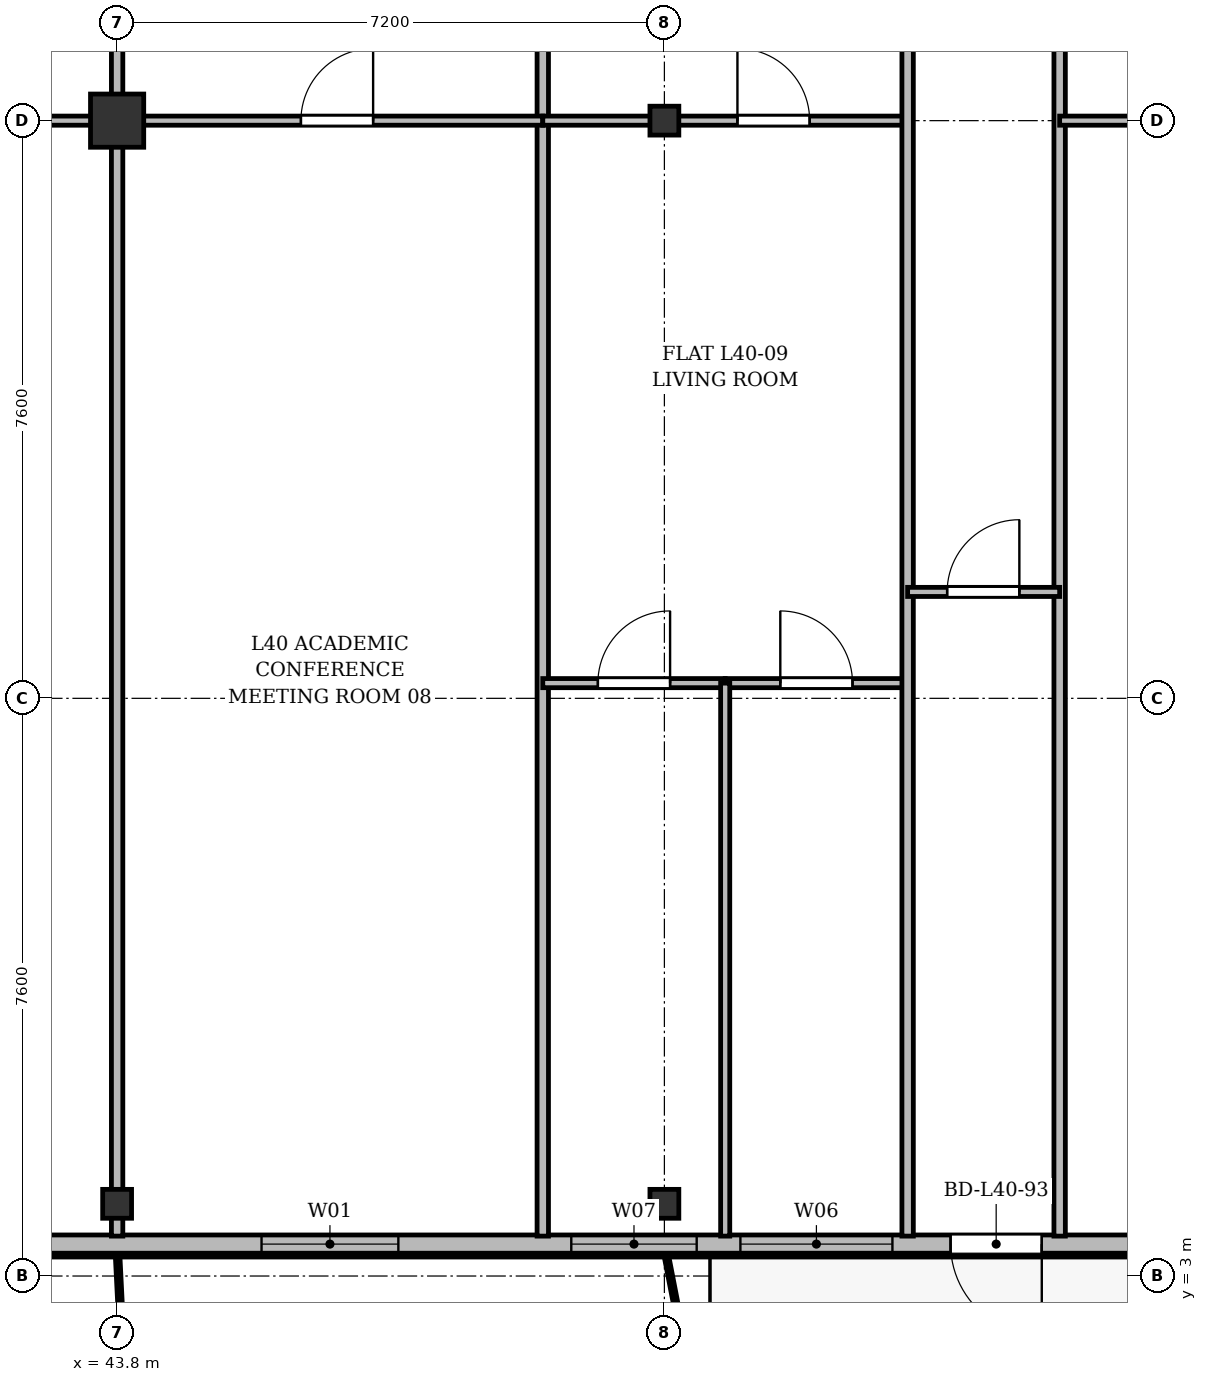
"""IFC4 building model, lengths in metres.
Left out: names, types, materials, properties, quantities, classifications, styles, units other than length and angle.
Written with IfcOpenShell. Run it as: python <this file> out.ifc"""

import sys

from ifc_helpers import new_model, si_unit, direction, frame, frame_2d, origin, origin_2d, place, context, subcontext, project, spatial, rectangle, i_section, extrude, source, transform, mapped, element, fill, save


model = new_model("IFC4")
c1 = context("Model", 3, precision=1e-05, world=origin(), true_north=direction((0.0, 1.0)))
c2 = subcontext(c1, "Body", "Model", "MODEL_VIEW")
j1 = project(units=[si_unit("LENGTHUNIT", "METRE"), si_unit("PLANEANGLEUNIT", "RADIAN")], contexts=[c1])
p1 = place(None, origin())
s1 = spatial("IfcSite", under=j1, at=p1, CompositionType="ELEMENT")
p2 = place(p1, origin())
s2 = spatial("IfcBuilding", under=s1, at=p2, CompositionType="ELEMENT")
p3 = place(p2, frame((0.0, 0.0, 153.7)))
s3 = spatial("IfcBuildingStorey", under=s2, at=p3, CompositionType="ELEMENT", Elevation=153.7)
m1 = source(origin(), c2, "Body", "SweptSolid", [
    extrude(i_section(OverallWidth=0.38, OverallDepth=0.38, WebThickness=0.02, FlangeThickness=0.03, at=origin_2d()), origin(), (0.0, 0.0, 1.0), 3.6),
])
p4 = place(p3, frame((43.8, 3.95, 0.0), z_axis=(0.0, 0.0, 1.0), x_axis=(1.0, 0.0, 0.0)))
e1 = element("IfcColumn", 1, at=p4, inside=s3, PredefinedType="COLUMN", context=c2, shape_type="MappedRepresentation", body=[
    mapped(m1, transform((0.0, 0.0, 0.0), x_axis=(1.0, 0.0, 0.0), y_axis=(0.0, 1.0, 0.0), z_axis=(0.0, 0.0, 1.0), scale=1.0)),
])
m2 = source(origin(), c2, "Body", "SweptSolid", [
    extrude(rectangle(XDim=0.7, YDim=0.7, at=origin_2d()), origin(), (0.0, 0.0, 1.0), 3.6),
])
p5 = place(p3, frame((43.8, 18.2, 0.0), z_axis=(0.0, 0.0, 1.0), x_axis=(1.0, 0.0, 0.0)))
e2 = element("IfcColumn", 2, at=p5, inside=s3, PredefinedType="COLUMN", context=c2, shape_type="MappedRepresentation", body=[
    mapped(m2, transform((0.0, 0.0, 0.0), x_axis=(1.0, 0.0, 0.0), y_axis=(0.0, 1.0, 0.0), z_axis=(0.0, 0.0, 1.0), scale=1.0)),
])
for number, where, z_axis, x_axis in (
    (3, (51.0, 3.95, 0.0), (0.0, 0.0, 1.0), (1.0, 0.0, 0.0)),
    (4, (51.0, 18.2, 0.0), (0.0, 0.0, 1.0), (1.0, 0.0, 0.0)),
):
    element("IfcColumn", number, at=place(p3, frame(where, z_axis=z_axis, x_axis=x_axis)), inside=s3, PredefinedType="COLUMN", context=c2, shape_type="MappedRepresentation", body=[
        mapped(m1, transform((0.0, 0.0, 0.0), x_axis=(1.0, 0.0, 0.0), y_axis=(0.0, 1.0, 0.0), z_axis=(0.0, 0.0, 1.0), scale=1.0)),
    ])
p6 = place(p3, frame((63.6, 3.42, 0.0), z_axis=(0.0, 0.0, 1.0), x_axis=(-1.0, 0.0, 0.0)))
e5 = element("IfcWall", 5, at=p6, inside=s3, PredefinedType="SOLIDWALL", context=c2, shape_type="SweptSolid", body=[
    extrude(rectangle(XDim=52.8, YDim=0.24, at=frame_2d((26.4, 0.0))), origin(), (0.0, 0.0, 1.0), 3.35),
])
p7 = place(p6, frame((0.295, 0.0, 0.9)))
e6 = element("IfcOpeningElement", 6, at=p7, cuts=e5, PredefinedType="OPENING", context=c2, shape_type="SweptSolid", body=[
    extrude(rectangle(XDim=1.5, YDim=1.75, at=frame_2d((0.75, 0.875))), frame((0.0, 0.13, 0.0), z_axis=(0.0, -1.0, 0.0), x_axis=(1.0, 0.0, 0.0)), (0.0, 0.0, 1.0), 0.26),
])
p8 = place(p6, frame((3.6, 0.0, 0.9)))
e7 = element("IfcOpeningElement", 7, at=p8, cuts=e5, PredefinedType="OPENING", context=c2, shape_type="SweptSolid", body=[
    extrude(rectangle(XDim=2.2, YDim=1.8, at=frame_2d((1.1, 0.9))), frame((0.0, 0.13, 0.0), z_axis=(0.0, -1.0, 0.0), x_axis=(1.0, 0.0, 0.0)), (0.0, 0.0, 1.0), 0.26),
])
p9 = place(p6, frame((7.635, 0.0, 0.0)))
e8 = element("IfcOpeningElement", 8, at=p9, cuts=e5, PredefinedType="OPENING", context=c2, shape_type="SweptSolid", body=[
    extrude(rectangle(XDim=1.2, YDim=2.2, at=frame_2d((0.6, 1.1))), frame((0.0, 0.13, 0.0), z_axis=(0.0, -1.0, 0.0), x_axis=(1.0, 0.0, 0.0)), (0.0, 0.0, 1.0), 0.26),
])
p10 = place(p6, frame((9.6, 0.0, 0.9)))
e9 = element("IfcOpeningElement", 9, at=p10, cuts=e5, PredefinedType="OPENING", context=c2, shape_type="SweptSolid", body=[
    extrude(rectangle(XDim=2.0, YDim=1.95, at=frame_2d((1.0, 0.975))), frame((0.0, 0.13, 0.0), z_axis=(0.0, -1.0, 0.0), x_axis=(1.0, 0.0, 0.0)), (0.0, 0.0, 1.0), 0.26),
])
p11 = place(p6, frame((12.175, 0.0, 0.9)))
e10 = element("IfcOpeningElement", 10, at=p11, cuts=e5, PredefinedType="OPENING", context=c2, shape_type="SweptSolid", body=[
    extrude(rectangle(XDim=1.65, YDim=1.85, at=frame_2d((0.825, 0.925))), frame((0.0, 0.13, 0.0), z_axis=(0.0, -1.0, 0.0), x_axis=(1.0, 0.0, 0.0)), (0.0, 0.0, 1.0), 0.26),
])
p12 = place(p6, frame((16.1, 0.0, 0.9)))
e11 = element("IfcOpeningElement", 11, at=p12, cuts=e5, PredefinedType="OPENING", context=c2, shape_type="SweptSolid", body=[
    extrude(rectangle(XDim=1.8, YDim=1.8, at=frame_2d((0.9, 0.9))), frame((0.0, 0.13, 0.0), z_axis=(0.0, -1.0, 0.0), x_axis=(1.0, 0.0, 0.0)), (0.0, 0.0, 1.0), 0.26),
])
p13 = place(p6, frame((22.3, 0.0, 0.9)))
e12 = element("IfcOpeningElement", 12, at=p13, cuts=e5, PredefinedType="OPENING", context=c2, shape_type="SweptSolid", body=[
    extrude(rectangle(XDim=2.2, YDim=1.8, at=frame_2d((1.1, 0.9))), frame((0.0, 0.13, 0.0), z_axis=(0.0, -1.0, 0.0), x_axis=(1.0, 0.0, 0.0)), (0.0, 0.0, 1.0), 0.26),
])
p14 = place(p6, frame((27.75, 0.0, 0.9)))
e13 = element("IfcOpeningElement", 13, at=p14, cuts=e5, PredefinedType="OPENING", context=c2, shape_type="SweptSolid", body=[
    extrude(rectangle(XDim=1.5, YDim=1.75, at=frame_2d((0.75, 0.875))), frame((0.0, 0.13, 0.0), z_axis=(0.0, -1.0, 0.0), x_axis=(1.0, 0.0, 0.0)), (0.0, 0.0, 1.0), 0.26),
])
p15 = place(p6, frame((30.5, 0.0, 0.9)))
e14 = element("IfcOpeningElement", 14, at=p15, cuts=e5, PredefinedType="OPENING", context=c2, shape_type="SweptSolid", body=[
    extrude(rectangle(XDim=2.0, YDim=1.95, at=frame_2d((1.0, 0.975))), frame((0.0, 0.13, 0.0), z_axis=(0.0, -1.0, 0.0), x_axis=(1.0, 0.0, 0.0)), (0.0, 0.0, 1.0), 0.26),
])
p16 = place(p6, frame((34.375, 0.0, 0.9)))
e15 = element("IfcOpeningElement", 15, at=p16, cuts=e5, PredefinedType="OPENING", context=c2, shape_type="SweptSolid", body=[
    extrude(rectangle(XDim=1.65, YDim=1.85, at=frame_2d((0.825, 0.925))), frame((0.0, 0.13, 0.0), z_axis=(0.0, -1.0, 0.0), x_axis=(1.0, 0.0, 0.0)), (0.0, 0.0, 1.0), 0.26),
])
p17 = place(p6, frame((39.5, 0.0, 0.9)))
e16 = element("IfcOpeningElement", 16, at=p17, cuts=e5, PredefinedType="OPENING", context=c2, shape_type="SweptSolid", body=[
    extrude(rectangle(XDim=1.8, YDim=1.8, at=frame_2d((0.9, 0.9))), frame((0.0, 0.13, 0.0), z_axis=(0.0, -1.0, 0.0), x_axis=(1.0, 0.0, 0.0)), (0.0, 0.0, 1.0), 0.26),
])
p18 = place(p6, frame((43.65, 0.0, 0.9)))
e17 = element("IfcOpeningElement", 17, at=p18, cuts=e5, PredefinedType="OPENING", context=c2, shape_type="SweptSolid", body=[
    extrude(rectangle(XDim=1.5, YDim=1.75, at=frame_2d((0.75, 0.875))), frame((0.0, 0.13, 0.0), z_axis=(0.0, -1.0, 0.0), x_axis=(1.0, 0.0, 0.0)), (0.0, 0.0, 1.0), 0.26),
])
p19 = place(p6, frame((47.35, 0.0, 0.9)))
e18 = element("IfcOpeningElement", 18, at=p19, cuts=e5, PredefinedType="OPENING", context=c2, shape_type="SweptSolid", body=[
    extrude(rectangle(XDim=1.5, YDim=1.75, at=frame_2d((0.75, 0.875))), frame((0.0, 0.13, 0.0), z_axis=(0.0, -1.0, 0.0), x_axis=(1.0, 0.0, 0.0)), (0.0, 0.0, 1.0), 0.26),
])
p20 = place(p6, frame((51.005, 0.0, 0.9)))
e19 = element("IfcOpeningElement", 19, at=p20, cuts=e5, PredefinedType="OPENING", context=c2, shape_type="SweptSolid", body=[
    extrude(rectangle(XDim=1.5, YDim=1.75, at=frame_2d((0.75, 0.875))), frame((0.0, 0.13, 0.0), z_axis=(0.0, -1.0, 0.0), x_axis=(1.0, 0.0, 0.0)), (0.0, 0.0, 1.0), 0.26),
])
p21 = place(p6, frame((37.85, 0.0, 0.0)))
e20 = element("IfcOpeningElement", 20, at=p21, cuts=e5, PredefinedType="OPENING", context=c2, shape_type="SweptSolid", body=[
    extrude(rectangle(XDim=1.2, YDim=2.2, at=frame_2d((0.6, 1.1))), frame((0.0, 0.13, 0.0), z_axis=(0.0, -1.0, 0.0), x_axis=(1.0, 0.0, 0.0)), (0.0, 0.0, 1.0), 0.26),
])
p22 = place(p3, frame((43.8, 3.525, 0.0), z_axis=(0.0, 0.0, 1.0), x_axis=(0.0, 1.0, 0.0)))
e21 = element("IfcWall", 21, at=p22, inside=s3, PredefinedType="PARTITIONING", context=c2, shape_type="SweptSolid", body=[
    extrude(rectangle(XDim=27.275, YDim=0.15, at=frame_2d((13.638, 0.0))), origin(), (0.0, 0.0, 1.0), 2.85),
])
p23 = place(p3, frame((49.4, 3.525, 0.0), z_axis=(0.0, 0.0, 1.0), x_axis=(0.0, 1.0, 0.0)))
e22 = element("IfcWall", 22, at=p23, inside=s3, PredefinedType="PARTITIONING", context=c2, shape_type="SweptSolid", body=[
    extrude(rectangle(XDim=27.275, YDim=0.15, at=frame_2d((13.638, 0.0))), origin(), (0.0, 0.0, 1.0), 2.75),
])
p24 = place(p3, frame((36.6, 18.2, 0.0), z_axis=(0.0, 0.0, 1.0), x_axis=(1.0, 0.0, 0.0)))
e23 = element("IfcWall", 23, at=p24, inside=s3, PredefinedType="PARTITIONING", context=c2, shape_type="SweptSolid", body=[
    extrude(rectangle(XDim=7.2, YDim=0.12, at=frame_2d((3.6, 0.0))), origin(), (0.0, 0.0, 1.0), 2.75),
])
p25 = place(p24, frame((3.125, 0.0, 0.0)))
e24 = element("IfcOpeningElement", 24, at=p25, cuts=e23, PredefinedType="OPENING", context=c2, shape_type="SweptSolid", body=[
    extrude(rectangle(XDim=0.95, YDim=2.15, at=frame_2d((0.475, 1.075))), frame((0.0, 0.07, 0.0), z_axis=(0.0, -1.0, 0.0), x_axis=(1.0, 0.0, 0.0)), (0.0, 0.0, 1.0), 0.14),
])
p26 = place(p3, frame((43.8, 18.2, 0.0), z_axis=(0.0, 0.0, 1.0), x_axis=(1.0, 0.0, 0.0)))
e25 = element("IfcWall", 25, at=p26, inside=s3, PredefinedType="PARTITIONING", context=c2, shape_type="SweptSolid", body=[
    extrude(rectangle(XDim=5.6, YDim=0.12, at=frame_2d((2.8, 0.0))), origin(), (0.0, 0.0, 1.0), 2.75),
])
p27 = place(p26, frame((2.418, 0.0, 0.0)))
e26 = element("IfcOpeningElement", 26, at=p27, cuts=e25, PredefinedType="OPENING", context=c2, shape_type="SweptSolid", body=[
    extrude(rectangle(XDim=0.95, YDim=2.15, at=frame_2d((0.475, 1.075))), frame((0.0, 0.07, 0.0), z_axis=(0.0, -1.0, 0.0), x_axis=(1.0, 0.0, 0.0)), (0.0, 0.0, 1.0), 0.14),
])
p28 = place(p3, frame((49.4, 18.2, 0.0), z_axis=(0.0, 0.0, 1.0), x_axis=(1.0, 0.0, 0.0)))
e27 = element("IfcWall", 27, at=p28, inside=s3, PredefinedType="PARTITIONING", context=c2, shape_type="SweptSolid", body=[
    extrude(rectangle(XDim=4.8, YDim=0.12, at=frame_2d((2.4, 0.0))), origin(), (0.0, 0.0, 1.0), 2.75),
])
p29 = place(p28, frame((2.561, 0.0, 0.0)))
e28 = element("IfcOpeningElement", 28, at=p29, cuts=e27, PredefinedType="OPENING", context=c2, shape_type="SweptSolid", body=[
    extrude(rectangle(XDim=0.95, YDim=2.15, at=frame_2d((0.475, 1.075))), frame((0.0, 0.07, 0.0), z_axis=(0.0, -1.0, 0.0), x_axis=(1.0, 0.0, 0.0)), (0.0, 0.0, 1.0), 0.14),
])
p30 = place(p3, frame((49.4, 10.8, 0.0), z_axis=(0.0, 0.0, 1.0), x_axis=(1.0, 0.0, 0.0)))
e29 = element("IfcWall", 29, at=p30, inside=s3, PredefinedType="PARTITIONING", context=c2, shape_type="SweptSolid", body=[
    extrude(rectangle(XDim=2.4, YDim=0.12, at=frame_2d((1.2, 0.0))), origin(), (0.0, 0.0, 1.0), 2.85),
])
p31 = place(p30, frame((0.725, 0.0, 0.0)))
e30 = element("IfcOpeningElement", 30, at=p31, cuts=e29, PredefinedType="OPENING", context=c2, shape_type="SweptSolid", body=[
    extrude(rectangle(XDim=0.95, YDim=2.15, at=frame_2d((0.475, 1.075))), frame((0.0, 0.07, 0.0), z_axis=(0.0, -1.0, 0.0), x_axis=(1.0, 0.0, 0.0)), (0.0, 0.0, 1.0), 0.14),
])
p32 = place(p3, frame((51.8, 10.8, 0.0), z_axis=(0.0, 0.0, 1.0), x_axis=(1.0, 0.0, 0.0)))
e31 = element("IfcWall", 31, at=p32, inside=s3, PredefinedType="PARTITIONING", context=c2, shape_type="SweptSolid", body=[
    extrude(rectangle(XDim=2.4, YDim=0.12, at=frame_2d((1.2, 0.0))), origin(), (0.0, 0.0, 1.0), 3.35),
])
p33 = place(p32, frame((0.725, 0.0, 0.0)))
e32 = element("IfcOpeningElement", 32, at=p33, cuts=e31, PredefinedType="OPENING", context=c2, shape_type="SweptSolid", body=[
    extrude(rectangle(XDim=0.95, YDim=2.15, at=frame_2d((0.475, 1.075))), frame((0.0, 0.07, 0.0), z_axis=(0.0, -1.0, 0.0), x_axis=(1.0, 0.0, 0.0)), (0.0, 0.0, 1.0), 0.14),
])
p34 = place(p3, frame((51.8, 3.525, 0.0), z_axis=(0.0, 0.0, 1.0), x_axis=(0.0, 1.0, 0.0)))
e33 = element("IfcWall", 33, at=p34, inside=s3, PredefinedType="PARTITIONING", context=c2, shape_type="SweptSolid", body=[
    extrude(rectangle(XDim=7.275, YDim=0.12, at=frame_2d((3.638, 0.0))), origin(), (0.0, 0.0, 1.0), 2.75),
])
for number, where, z_axis, x_axis in (
    (34, (54.2, 3.525, 0.0), (0.0, 0.0, 1.0), (0.0, 1.0, 0.0)),
    (35, (56.2, 3.525, 0.0), (0.0, 0.0, 1.0), (0.0, 1.0, 0.0)),
):
    element("IfcWall", number, at=place(p3, frame(where, z_axis=z_axis, x_axis=x_axis)), inside=s3, PredefinedType="PARTITIONING", context=c2, shape_type="SweptSolid", body=[
        extrude(rectangle(XDim=27.275, YDim=0.15, at=frame_2d((13.638, 0.0))), origin(), (0.0, 0.0, 1.0), 2.75),
    ])
p35 = place(p3, frame((54.2, 12.0, 0.0), z_axis=(0.0, 0.0, 1.0), x_axis=(1.0, 0.0, 0.0)))
e36 = element("IfcWall", 36, at=p35, inside=s3, PredefinedType="PARTITIONING", context=c2, shape_type="SweptSolid", body=[
    extrude(rectangle(XDim=2.0, YDim=0.12, at=frame_2d((1.0, 0.0))), origin(), (0.0, 0.0, 1.0), 3.35),
])
p36 = place(p35, frame((0.52, 0.0, 0.0)))
e37 = element("IfcOpeningElement", 37, at=p36, cuts=e36, PredefinedType="OPENING", context=c2, shape_type="SweptSolid", body=[
    extrude(rectangle(XDim=0.95, YDim=2.15, at=frame_2d((0.475, 1.075))), frame((0.0, 0.07, 0.0), z_axis=(0.0, -1.0, 0.0), x_axis=(1.0, 0.0, 0.0)), (0.0, 0.0, 1.0), 0.14),
])
p37 = place(p3, frame((56.2, 18.2, 0.0), z_axis=(0.0, 0.0, 1.0), x_axis=(1.0, 0.0, 0.0)))
e38 = element("IfcWall", 38, at=p37, inside=s3, PredefinedType="PARTITIONING", context=c2, shape_type="SweptSolid", body=[
    extrude(rectangle(XDim=5.4, YDim=0.12, at=frame_2d((2.7, 0.0))), origin(), (0.0, 0.0, 1.0), 2.75),
])
p38 = place(p37, frame((3.701, 0.0, 0.0)))
e39 = element("IfcOpeningElement", 39, at=p38, cuts=e38, PredefinedType="OPENING", context=c2, shape_type="SweptSolid", body=[
    extrude(rectangle(XDim=0.95, YDim=2.15, at=frame_2d((0.475, 1.075))), frame((0.0, 0.07, 0.0), z_axis=(0.0, -1.0, 0.0), x_axis=(1.0, 0.0, 0.0)), (0.0, 0.0, 1.0), 0.14),
])
m3 = source(origin(), c2, "Body", "SweptSolid", [
    extrude(rectangle(XDim=1.2, YDim=2.2, at=frame_2d((0.6, 1.1))), frame((0.0, 0.025, 0.0), z_axis=(0.0, -1.0, 0.0), x_axis=(1.0, 0.0, 0.0)), (0.0, 0.0, 1.0), 0.05),
])
p39 = place(p9, origin())
e40 = element("IfcDoor", 40, at=p39, inside=s3, OperationType="SINGLE_SWING_LEFT", PredefinedType="DOOR", context=c2, shape_type="MappedRepresentation", body=[
    mapped(m3, transform((0.0, 0.0, 0.0), x_axis=(1.0, 0.0, 0.0), y_axis=(0.0, 1.0, 0.0), z_axis=(0.0, 0.0, 1.0), scale=1.0)),
])
fill(e8, e40)
m4 = source(origin(), c2, "Body", "SweptSolid", [
    extrude(rectangle(XDim=2.0, YDim=1.95, at=frame_2d((1.0, 0.975))), frame((0.0, 0.03, 0.0), z_axis=(0.0, -1.0, 0.0), x_axis=(1.0, 0.0, 0.0)), (0.0, 0.0, 1.0), 0.06),
])
p40 = place(p10, origin())
e41 = element("IfcWindow", 41, at=p40, inside=s3, PartitioningType="SINGLE_PANEL", PredefinedType="WINDOW", context=c2, shape_type="MappedRepresentation", body=[
    mapped(m4, transform((0.0, 0.0, 0.0), x_axis=(1.0, 0.0, 0.0), y_axis=(0.0, 1.0, 0.0), z_axis=(0.0, 0.0, 1.0), scale=1.0)),
])
fill(e9, e41)
m5 = source(origin(), c2, "Body", "SweptSolid", [
    extrude(rectangle(XDim=1.65, YDim=1.85, at=frame_2d((0.825, 0.925))), frame((0.0, 0.03, 0.0), z_axis=(0.0, -1.0, 0.0), x_axis=(1.0, 0.0, 0.0)), (0.0, 0.0, 1.0), 0.06),
])
p41 = place(p11, origin())
e42 = element("IfcWindow", 42, at=p41, inside=s3, PartitioningType="SINGLE_PANEL", PredefinedType="WINDOW", context=c2, shape_type="MappedRepresentation", body=[
    mapped(m5, transform((0.0, 0.0, 0.0), x_axis=(1.0, 0.0, 0.0), y_axis=(0.0, 1.0, 0.0), z_axis=(0.0, 0.0, 1.0), scale=1.0)),
])
fill(e10, e42)
m6 = source(origin(), c2, "Body", "SweptSolid", [
    extrude(rectangle(XDim=1.8, YDim=1.8, at=frame_2d((0.9, 0.9))), frame((0.0, 0.03, 0.0), z_axis=(0.0, -1.0, 0.0), x_axis=(1.0, 0.0, 0.0)), (0.0, 0.0, 1.0), 0.06),
])
p42 = place(p12, origin())
e43 = element("IfcWindow", 43, at=p42, inside=s3, PartitioningType="SINGLE_PANEL", PredefinedType="WINDOW", context=c2, shape_type="MappedRepresentation", body=[
    mapped(m6, transform((0.0, 0.0, 0.0), x_axis=(1.0, 0.0, 0.0), y_axis=(0.0, 1.0, 0.0), z_axis=(0.0, 0.0, 1.0), scale=1.0)),
])
fill(e11, e43)
m7 = source(origin(), c2, "Body", "SweptSolid", [
    extrude(rectangle(XDim=0.95, YDim=2.15, at=frame_2d((0.475, 1.075))), frame((0.0, 0.025, 0.0), z_axis=(0.0, -1.0, 0.0), x_axis=(1.0, 0.0, 0.0)), (0.0, 0.0, 1.0), 0.05),
])
p43 = place(p27, origin())
e44 = element("IfcDoor", 44, at=p43, inside=s3, OperationType="SINGLE_SWING_RIGHT", PredefinedType="DOOR", context=c2, shape_type="MappedRepresentation", body=[
    mapped(m7, transform((0.0, 0.0, 0.0), x_axis=(1.0, 0.0, 0.0), y_axis=(0.0, 1.0, 0.0), z_axis=(0.0, 0.0, 1.0), scale=1.0)),
])
fill(e26, e44)
p44 = place(p29, origin())
e45 = element("IfcDoor", 45, at=p44, inside=s3, OperationType="SINGLE_SWING_LEFT", PredefinedType="DOOR", context=c2, shape_type="MappedRepresentation", body=[
    mapped(m7, transform((0.0, 0.0, 0.0), x_axis=(1.0, 0.0, 0.0), y_axis=(0.0, 1.0, 0.0), z_axis=(0.0, 0.0, 1.0), scale=1.0)),
])
fill(e28, e45)
p45 = place(p31, origin())
e46 = element("IfcDoor", 46, at=p45, inside=s3, OperationType="SINGLE_SWING_RIGHT", PredefinedType="DOOR", context=c2, shape_type="MappedRepresentation", body=[
    mapped(m7, transform((0.0, 0.0, 0.0), x_axis=(1.0, 0.0, 0.0), y_axis=(0.0, 1.0, 0.0), z_axis=(0.0, 0.0, 1.0), scale=1.0)),
])
fill(e30, e46)
p46 = place(p33, origin())
e47 = element("IfcDoor", 47, at=p46, inside=s3, OperationType="SINGLE_SWING_LEFT", PredefinedType="DOOR", context=c2, shape_type="MappedRepresentation", body=[
    mapped(m7, transform((0.0, 0.0, 0.0), x_axis=(1.0, 0.0, 0.0), y_axis=(0.0, 1.0, 0.0), z_axis=(0.0, 0.0, 1.0), scale=1.0)),
])
fill(e32, e47)
p47 = place(p36, origin())
e48 = element("IfcDoor", 48, at=p47, inside=s3, OperationType="SINGLE_SWING_RIGHT", PredefinedType="DOOR", context=c2, shape_type="MappedRepresentation", body=[
    mapped(m7, transform((0.0, 0.0, 0.0), x_axis=(1.0, 0.0, 0.0), y_axis=(0.0, 1.0, 0.0), z_axis=(0.0, 0.0, 1.0), scale=1.0)),
])
fill(e37, e48)
save(model, sys.argv[1])
